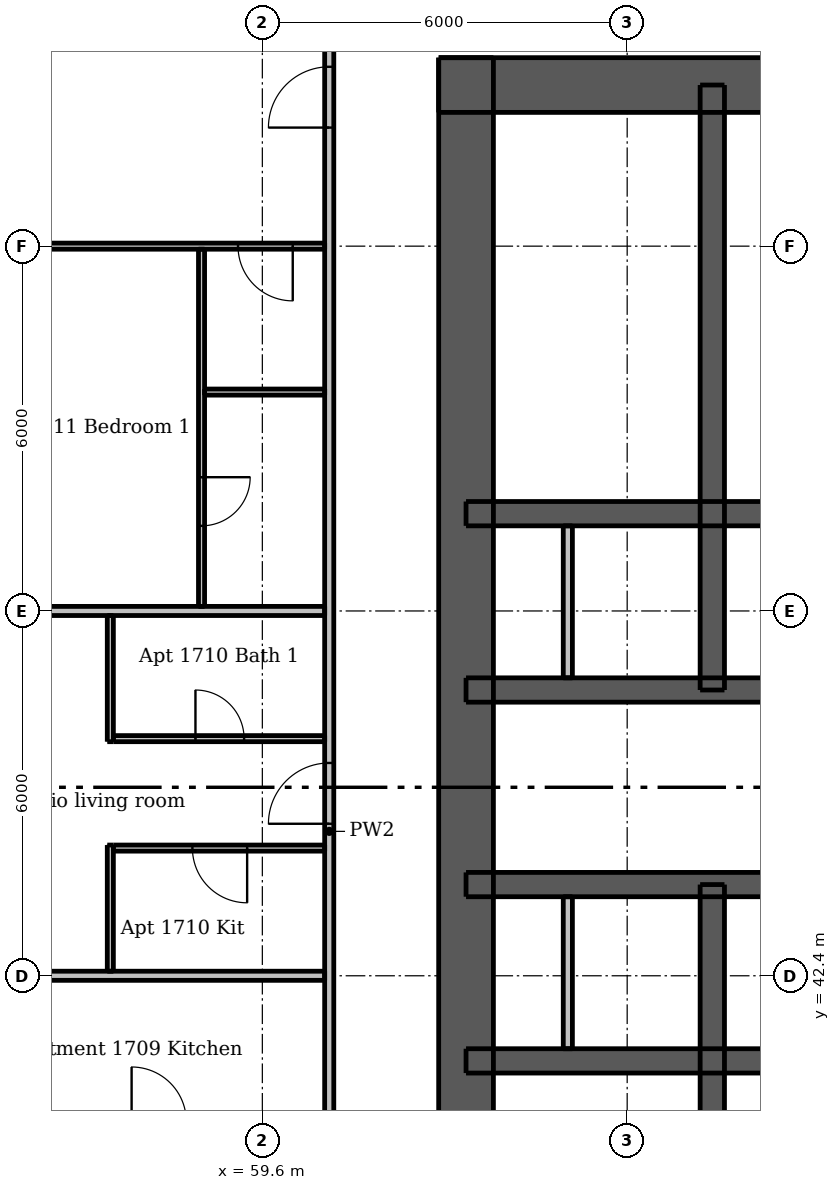
"""IFC4 building model, lengths in metres.
Left out: names, types, materials, properties, quantities, classifications, styles, units other than length and angle.
Written with IfcOpenShell. Run it as: python <this file> out.ifc"""

import sys

from ifc_helpers import new_model, si_unit, direction, frame, frame_2d, origin, place, context, subcontext, project, spatial, rectangle, extrude, element, fill, save


model = new_model("IFC4")
c1 = context("Model", 3, precision=1e-05, world=origin(), true_north=direction((0.0, 1.0)))
c2 = subcontext(c1, "Body", "Model", "MODEL_VIEW")
j1 = project(units=[si_unit("LENGTHUNIT", "METRE"), si_unit("PLANEANGLEUNIT", "RADIAN")], contexts=[c1])
p1 = place(None, origin())
s1 = spatial("IfcSite", under=j1, at=p1, CompositionType="ELEMENT")
p2 = place(p1, origin())
s2 = spatial("IfcBuilding", under=s1, at=p2, CompositionType="ELEMENT")
p3 = place(p2, frame((0.0, 0.0, 63.1)))
s3 = spatial("IfcBuildingStorey", under=s2, at=p3, CompositionType="ELEMENT", Elevation=63.1)
p4 = place(p3, frame((62.5, 57.05, 0.0), z_axis=(0.0, 0.0, 1.0), x_axis=(1.0, 0.0, 0.0)))
e1 = element("IfcWall", 1, at=p4, inside=s3, PredefinedType="SHEAR", context=c2, shape_type="SweptSolid", body=[
    extrude(rectangle(XDim=24.0, YDim=0.9, at=frame_2d((12.0, 0.0))), origin(), (0.0, 0.0, 1.0), 3.05),
])
p5 = place(p4, frame((20.85, 0.0, 0.0)))
e2 = element("IfcOpeningElement", 2, at=p5, cuts=e1, PredefinedType="OPENING", context=c2, shape_type="SweptSolid", body=[
    extrude(rectangle(XDim=1.1, YDim=2.1, at=frame_2d((0.55, 1.05))), frame((0.0, 0.46, 0.0), z_axis=(0.0, -1.0, 0.0), x_axis=(1.0, 0.0, 0.0)), (0.0, 0.0, 1.0), 0.92),
])
p6 = place(p4, frame((2.05, 0.0, 0.0)))
e3 = element("IfcOpeningElement", 3, at=p6, cuts=e1, PredefinedType="OPENING", context=c2, shape_type="SweptSolid", body=[
    extrude(rectangle(XDim=1.1, YDim=2.1, at=frame_2d((0.55, 1.05))), frame((0.0, 0.46, 0.0), z_axis=(0.0, -1.0, 0.0), x_axis=(1.0, 0.0, 0.0)), (0.0, 0.0, 1.0), 0.92),
])
p7 = place(p4, frame((6.44, 0.0, 0.0)))
e4 = element("IfcOpeningElement", 4, at=p7, cuts=e1, PredefinedType="OPENING", context=c2, shape_type="SweptSolid", body=[
    extrude(rectangle(XDim=0.9, YDim=2.1, at=frame_2d((0.45, 1.05))), frame((0.0, 0.46, 0.0), z_axis=(0.0, -1.0, 0.0), x_axis=(1.0, 0.0, 0.0)), (0.0, 0.0, 1.0), 0.92),
])
p8 = place(p4, frame((13.74, 0.0, 0.0)))
e5 = element("IfcOpeningElement", 5, at=p8, cuts=e1, PredefinedType="OPENING", context=c2, shape_type="SweptSolid", body=[
    extrude(rectangle(XDim=0.9, YDim=2.1, at=frame_2d((0.45, 1.05))), frame((0.0, 0.46, 0.0), z_axis=(0.0, -1.0, 0.0), x_axis=(1.0, 0.0, 0.0)), (0.0, 0.0, 1.0), 0.92),
])
p9 = place(p3, frame((62.95, 33.5, 0.0), z_axis=(0.0, 0.0, 1.0), x_axis=(0.0, 1.0, 0.0)))
e6 = element("IfcWall", 6, at=p9, inside=s3, PredefinedType="SHEAR", context=c2, shape_type="SweptSolid", body=[
    extrude(rectangle(XDim=24.0, YDim=0.9, at=frame_2d((12.0, 0.0))), origin(), (0.0, 0.0, 1.0), 3.05),
])
p10 = place(p9, frame((11.2, 0.0, 0.0)))
e7 = element("IfcOpeningElement", 7, at=p10, cuts=e6, PredefinedType="OPENING", context=c2, shape_type="SweptSolid", body=[
    extrude(rectangle(XDim=1.6, YDim=2.1, at=frame_2d((0.8, 1.05))), frame((0.0, 0.46, 0.0), z_axis=(0.0, -1.0, 0.0), x_axis=(1.0, 0.0, 0.0)), (0.0, 0.0, 1.0), 0.92),
])
p11 = place(p3, frame((62.95, 41.0, 0.0), z_axis=(0.0, 0.0, 1.0), x_axis=(1.0, 0.0, 0.0)))
e8 = element("IfcWall", 8, at=p11, inside=s3, PredefinedType="SHEAR", context=c2, shape_type="SweptSolid", body=[
    extrude(rectangle(XDim=23.1, YDim=0.4, at=frame_2d((11.55, 0.0))), origin(), (0.0, 0.0, 1.0), 3.05),
])
p12 = place(p3, frame((62.95, 43.9, 0.0), z_axis=(0.0, 0.0, 1.0), x_axis=(1.0, 0.0, 0.0)))
e9 = element("IfcWall", 9, at=p12, inside=s3, PredefinedType="SHEAR", context=c2, shape_type="SweptSolid", body=[
    extrude(rectangle(XDim=23.1, YDim=0.4, at=frame_2d((11.55, 0.0))), origin(), (0.0, 0.0, 1.0), 3.05),
])
p13 = place(p12, frame((0.662, 0.0, 0.0)))
e10 = element("IfcOpeningElement", 10, at=p13, cuts=e9, PredefinedType="OPENING", context=c2, shape_type="SweptSolid", body=[
    extrude(rectangle(XDim=0.8, YDim=2.1, at=frame_2d((0.4, 1.05))), frame((0.0, 0.21, 0.0), z_axis=(0.0, -1.0, 0.0), x_axis=(1.0, 0.0, 0.0)), (0.0, 0.0, 1.0), 0.42),
])
p14 = place(p12, frame((2.312, 0.0, 0.0)))
e11 = element("IfcOpeningElement", 11, at=p14, cuts=e9, PredefinedType="OPENING", context=c2, shape_type="SweptSolid", body=[
    extrude(rectangle(XDim=0.9, YDim=2.1, at=frame_2d((0.45, 1.05))), frame((0.0, 0.21, 0.0), z_axis=(0.0, -1.0, 0.0), x_axis=(1.0, 0.0, 0.0)), (0.0, 0.0, 1.0), 0.42),
])
p15 = place(p12, frame((20.5, 0.0, 0.0)))
e12 = element("IfcOpeningElement", 12, at=p15, cuts=e9, PredefinedType="OPENING", context=c2, shape_type="SweptSolid", body=[
    extrude(rectangle(XDim=0.9, YDim=2.1, at=frame_2d((0.45, 1.05))), frame((0.0, 0.21, 0.0), z_axis=(0.0, -1.0, 0.0), x_axis=(1.0, 0.0, 0.0)), (0.0, 0.0, 1.0), 0.42),
])
p16 = place(p12, frame((4.75, 0.0, 0.0)))
e13 = element("IfcOpeningElement", 13, at=p16, cuts=e9, PredefinedType="OPENING", context=c2, shape_type="SweptSolid", body=[
    extrude(rectangle(XDim=1.1, YDim=2.1, at=frame_2d((0.55, 1.05))), frame((0.0, 0.21, 0.0), z_axis=(0.0, -1.0, 0.0), x_axis=(1.0, 0.0, 0.0)), (0.0, 0.0, 1.0), 0.42),
])
p17 = place(p12, frame((7.25, 0.0, 0.0)))
e14 = element("IfcOpeningElement", 14, at=p17, cuts=e9, PredefinedType="OPENING", context=c2, shape_type="SweptSolid", body=[
    extrude(rectangle(XDim=1.1, YDim=2.1, at=frame_2d((0.55, 1.05))), frame((0.0, 0.21, 0.0), z_axis=(0.0, -1.0, 0.0), x_axis=(1.0, 0.0, 0.0)), (0.0, 0.0, 1.0), 0.42),
])
p18 = place(p12, frame((9.75, 0.0, 0.0)))
e15 = element("IfcOpeningElement", 15, at=p18, cuts=e9, PredefinedType="OPENING", context=c2, shape_type="SweptSolid", body=[
    extrude(rectangle(XDim=1.1, YDim=2.1, at=frame_2d((0.55, 1.05))), frame((0.0, 0.21, 0.0), z_axis=(0.0, -1.0, 0.0), x_axis=(1.0, 0.0, 0.0)), (0.0, 0.0, 1.0), 0.42),
])
p19 = place(p12, frame((12.25, 0.0, 0.0)))
e16 = element("IfcOpeningElement", 16, at=p19, cuts=e9, PredefinedType="OPENING", context=c2, shape_type="SweptSolid", body=[
    extrude(rectangle(XDim=1.1, YDim=2.1, at=frame_2d((0.55, 1.05))), frame((0.0, 0.21, 0.0), z_axis=(0.0, -1.0, 0.0), x_axis=(1.0, 0.0, 0.0)), (0.0, 0.0, 1.0), 0.42),
])
p20 = place(p12, frame((14.75, 0.0, 0.0)))
e17 = element("IfcOpeningElement", 17, at=p20, cuts=e9, PredefinedType="OPENING", context=c2, shape_type="SweptSolid", body=[
    extrude(rectangle(XDim=1.1, YDim=2.1, at=frame_2d((0.55, 1.05))), frame((0.0, 0.21, 0.0), z_axis=(0.0, -1.0, 0.0), x_axis=(1.0, 0.0, 0.0)), (0.0, 0.0, 1.0), 0.42),
])
p21 = place(p12, frame((17.25, 0.0, 0.0)))
e18 = element("IfcOpeningElement", 18, at=p21, cuts=e9, PredefinedType="OPENING", context=c2, shape_type="SweptSolid", body=[
    extrude(rectangle(XDim=1.1, YDim=2.1, at=frame_2d((0.55, 1.05))), frame((0.0, 0.21, 0.0), z_axis=(0.0, -1.0, 0.0), x_axis=(1.0, 0.0, 0.0)), (0.0, 0.0, 1.0), 0.42),
])
p22 = place(p3, frame((62.95, 47.1, 0.0), z_axis=(0.0, 0.0, 1.0), x_axis=(1.0, 0.0, 0.0)))
e19 = element("IfcWall", 19, at=p22, inside=s3, PredefinedType="SHEAR", context=c2, shape_type="SweptSolid", body=[
    extrude(rectangle(XDim=23.1, YDim=0.4, at=frame_2d((11.55, 0.0))), origin(), (0.0, 0.0, 1.0), 3.05),
])
p23 = place(p22, frame((0.662, 0.0, 0.0)))
e20 = element("IfcOpeningElement", 20, at=p23, cuts=e19, PredefinedType="OPENING", context=c2, shape_type="SweptSolid", body=[
    extrude(rectangle(XDim=0.8, YDim=2.1, at=frame_2d((0.4, 1.05))), frame((0.0, 0.21, 0.0), z_axis=(0.0, -1.0, 0.0), x_axis=(1.0, 0.0, 0.0)), (0.0, 0.0, 1.0), 0.42),
])
p24 = place(p22, frame((2.312, 0.0, 0.0)))
e21 = element("IfcOpeningElement", 21, at=p24, cuts=e19, PredefinedType="OPENING", context=c2, shape_type="SweptSolid", body=[
    extrude(rectangle(XDim=0.9, YDim=2.1, at=frame_2d((0.45, 1.05))), frame((0.0, 0.21, 0.0), z_axis=(0.0, -1.0, 0.0), x_axis=(1.0, 0.0, 0.0)), (0.0, 0.0, 1.0), 0.42),
])
p25 = place(p22, frame((20.5, 0.0, 0.0)))
e22 = element("IfcOpeningElement", 22, at=p25, cuts=e19, PredefinedType="OPENING", context=c2, shape_type="SweptSolid", body=[
    extrude(rectangle(XDim=0.9, YDim=2.1, at=frame_2d((0.45, 1.05))), frame((0.0, 0.21, 0.0), z_axis=(0.0, -1.0, 0.0), x_axis=(1.0, 0.0, 0.0)), (0.0, 0.0, 1.0), 0.42),
])
p26 = place(p3, frame((62.95, 50.0, 0.0), z_axis=(0.0, 0.0, 1.0), x_axis=(1.0, 0.0, 0.0)))
e23 = element("IfcWall", 23, at=p26, inside=s3, PredefinedType="SHEAR", context=c2, shape_type="SweptSolid", body=[
    extrude(rectangle(XDim=23.1, YDim=0.4, at=frame_2d((11.55, 0.0))), origin(), (0.0, 0.0, 1.0), 3.05),
])
p27 = place(p3, frame((67.0, 33.95, 0.0), z_axis=(0.0, 0.0, 1.0), x_axis=(0.0, 1.0, 0.0)))
e24 = element("IfcWall", 24, at=p27, inside=s3, PredefinedType="SHEAR", context=c2, shape_type="SweptSolid", body=[
    extrude(rectangle(XDim=9.95, YDim=0.4, at=frame_2d((4.975, 0.0))), origin(), (0.0, 0.0, 1.0), 3.05),
])
p28 = place(p27, frame((0.65, 0.0, 0.0)))
e25 = element("IfcOpeningElement", 25, at=p28, cuts=e24, PredefinedType="OPENING", context=c2, shape_type="SweptSolid", body=[
    extrude(rectangle(XDim=1.1, YDim=2.1, at=frame_2d((0.55, 1.05))), frame((0.0, 0.21, 0.0), z_axis=(0.0, -1.0, 0.0), x_axis=(1.0, 0.0, 0.0)), (0.0, 0.0, 1.0), 0.42),
])
p29 = place(p3, frame((67.0, 47.1, 0.0), z_axis=(0.0, 0.0, 1.0), x_axis=(0.0, 1.0, 0.0)))
e26 = element("IfcWall", 26, at=p29, inside=s3, PredefinedType="SHEAR", context=c2, shape_type="SweptSolid", body=[
    extrude(rectangle(XDim=9.95, YDim=0.4, at=frame_2d((4.975, 0.0))), origin(), (0.0, 0.0, 1.0), 3.05),
])
for number, where, z_axis, x_axis in (
    (27, (64.624, 41.2, 0.0), (0.0, 0.0, 1.0), (0.0, 1.0, 0.0)),
    (28, (64.624, 47.3, 0.0), (0.0, 0.0, 1.0), (0.0, 1.0, 0.0)),
):
    element("IfcWall", number, at=place(p3, frame(where, z_axis=z_axis, x_axis=x_axis)), inside=s3, PredefinedType="PLUMBINGWALL", context=c2, shape_type="SweptSolid", body=[
        extrude(rectangle(XDim=2.5, YDim=0.15, at=frame_2d((1.25, 0.0))), origin(), (0.0, 0.0, 1.0), 3.05),
    ])
for number, where, z_axis, x_axis in (
    (29, (57.1, 42.475, 0.0), (0.0, 0.0, 1.0), (0.0, 1.0, 0.0)),
    (30, (57.1, 46.25, 0.0), (0.0, 0.0, 1.0), (0.0, 1.0, 0.0)),
):
    element("IfcWall", number, at=place(p3, frame(where, z_axis=z_axis, x_axis=x_axis)), inside=s3, PredefinedType="PARTITIONING", context=c2, shape_type="SweptSolid", body=[
        extrude(rectangle(XDim=2.075, YDim=0.1, at=frame_2d((1.038, 0.0))), origin(), (0.0, 0.0, 1.0), 3.05),
    ])
p30 = place(p3, frame((58.6, 54.35, 0.0), z_axis=(0.0, 0.0, 1.0), x_axis=(0.0, -1.0, 0.0)))
e31 = element("IfcWall", 31, at=p30, inside=s3, PredefinedType="PARTITIONING", context=c2, shape_type="SweptSolid", body=[
    extrude(rectangle(XDim=5.875, YDim=0.1, at=frame_2d((2.938, 0.0))), origin(), (0.0, 0.0, 1.0), 3.05),
])
p31 = place(p30, frame((3.75, 0.0, 0.0)))
e32 = element("IfcOpeningElement", 32, at=p31, cuts=e31, PredefinedType="OPENING", context=c2, shape_type="SweptSolid", body=[
    extrude(rectangle(XDim=0.8, YDim=2.1, at=frame_2d((0.4, 1.05))), frame((0.0, 0.06, 0.0), z_axis=(0.0, -1.0, 0.0), x_axis=(1.0, 0.0, 0.0)), (0.0, 0.0, 1.0), 0.12),
])
p32 = place(p3, frame((60.625, 54.4, 0.0), z_axis=(0.0, 0.0, 1.0), x_axis=(-1.0, 0.0, 0.0)))
e33 = element("IfcWall", 33, at=p32, inside=s3, PredefinedType="PARTITIONING", context=c2, shape_type="SweptSolid", body=[
    extrude(rectangle(XDim=8.625, YDim=0.1, at=frame_2d((4.312, 0.0))), origin(), (0.0, 0.0, 1.0), 2.516),
])
p33 = place(p32, frame((0.525, 0.0, 0.0)))
e34 = element("IfcOpeningElement", 34, at=p33, cuts=e33, PredefinedType="OPENING", context=c2, shape_type="SweptSolid", body=[
    extrude(rectangle(XDim=0.9, YDim=2.1, at=frame_2d((0.45, 1.05))), frame((0.0, 0.06, 0.0), z_axis=(0.0, -1.0, 0.0), x_axis=(1.0, 0.0, 0.0)), (0.0, 0.0, 1.0), 0.12),
])
p34 = place(p32, frame((4.875, 0.0, 0.0)))
e35 = element("IfcOpeningElement", 35, at=p34, cuts=e33, PredefinedType="OPENING", context=c2, shape_type="SweptSolid", body=[
    extrude(rectangle(XDim=0.9, YDim=2.1, at=frame_2d((0.45, 1.05))), frame((0.0, 0.06, 0.0), z_axis=(0.0, -1.0, 0.0), x_axis=(1.0, 0.0, 0.0)), (0.0, 0.0, 1.0), 0.12),
])
p35 = place(p3, frame((58.65, 52.0, 0.0), z_axis=(0.0, 0.0, 1.0), x_axis=(1.0, 0.0, 0.0)))
e36 = element("IfcWall", 36, at=p35, inside=s3, PredefinedType="PARTITIONING", context=c2, shape_type="SweptSolid", body=[
    extrude(rectangle(XDim=1.975, YDim=0.1, at=frame_2d((0.988, 0.0))), origin(), (0.0, 0.0, 1.0), 3.05),
])
p36 = place(p3, frame((57.15, 46.3, 0.0), z_axis=(0.0, 0.0, 1.0), x_axis=(1.0, 0.0, 0.0)))
e37 = element("IfcWall", 37, at=p36, inside=s3, PredefinedType="PARTITIONING", context=c2, shape_type="SweptSolid", body=[
    extrude(rectangle(XDim=3.475, YDim=0.1, at=frame_2d((1.738, 0.0))), origin(), (0.0, 0.0, 1.0), 3.05),
])
p37 = place(p36, frame((1.35, 0.0, 0.0)))
e38 = element("IfcOpeningElement", 38, at=p37, cuts=e37, PredefinedType="OPENING", context=c2, shape_type="SweptSolid", body=[
    extrude(rectangle(XDim=0.8, YDim=2.1, at=frame_2d((0.4, 1.05))), frame((0.0, 0.06, 0.0), z_axis=(0.0, -1.0, 0.0), x_axis=(1.0, 0.0, 0.0)), (0.0, 0.0, 1.0), 0.12),
])
p38 = place(p3, frame((60.625, 44.5, 0.0), z_axis=(0.0, 0.0, 1.0), x_axis=(-1.0, 0.0, 0.0)))
e39 = element("IfcWall", 39, at=p38, inside=s3, PredefinedType="PARTITIONING", context=c2, shape_type="SweptSolid", body=[
    extrude(rectangle(XDim=3.475, YDim=0.1, at=frame_2d((1.738, 0.0))), origin(), (0.0, 0.0, 1.0), 3.05),
])
p39 = place(p38, frame((1.275, 0.0, 0.0)))
e40 = element("IfcOpeningElement", 40, at=p39, cuts=e39, PredefinedType="OPENING", context=c2, shape_type="SweptSolid", body=[
    extrude(rectangle(XDim=0.9, YDim=2.1, at=frame_2d((0.45, 1.05))), frame((0.0, 0.06, 0.0), z_axis=(0.0, -1.0, 0.0), x_axis=(1.0, 0.0, 0.0)), (0.0, 0.0, 1.0), 0.12),
])
p40 = place(p3, frame((60.7, 30.325, 0.0), z_axis=(0.0, 0.0, 1.0), x_axis=(0.0, 1.0, 0.0)))
e41 = element("IfcWall", 41, at=p40, inside=s3, PredefinedType="PARTITIONING", context=c2, shape_type="SweptSolid", body=[
    extrude(rectangle(XDim=28.9, YDim=0.15, at=frame_2d((14.45, 0.0))), origin(), (0.0, 0.0, 1.0), 3.05),
])
p41 = place(p40, frame((7.375, 0.0, 0.0)))
e42 = element("IfcOpeningElement", 42, at=p41, cuts=e41, PredefinedType="OPENING", context=c2, shape_type="SweptSolid", body=[
    extrude(rectangle(XDim=1.0, YDim=2.1, at=frame_2d((0.5, 1.05))), frame((0.0, 0.085, 0.0), z_axis=(0.0, -1.0, 0.0), x_axis=(1.0, 0.0, 0.0)), (0.0, 0.0, 1.0), 0.17),
])
p42 = place(p40, frame((14.575, 0.0, 0.0)))
e43 = element("IfcOpeningElement", 43, at=p42, cuts=e41, PredefinedType="OPENING", context=c2, shape_type="SweptSolid", body=[
    extrude(rectangle(XDim=1.0, YDim=2.1, at=frame_2d((0.5, 1.05))), frame((0.0, 0.085, 0.0), z_axis=(0.0, -1.0, 0.0), x_axis=(1.0, 0.0, 0.0)), (0.0, 0.0, 1.0), 0.17),
])
p43 = place(p40, frame((26.025, 0.0, 0.0)))
e44 = element("IfcOpeningElement", 44, at=p43, cuts=e41, PredefinedType="OPENING", context=c2, shape_type="SweptSolid", body=[
    extrude(rectangle(XDim=1.0, YDim=2.1, at=frame_2d((0.5, 1.05))), frame((0.0, 0.085, 0.0), z_axis=(0.0, -1.0, 0.0), x_axis=(1.0, 0.0, 0.0)), (0.0, 0.0, 1.0), 0.17),
])
for number, where, z_axis, x_axis in (
    (45, (52.0, 48.4, 0.0), (0.0, 0.0, 1.0), (1.0, 0.0, 0.0)),
    (46, (52.0, 42.4, 0.0), (0.0, 0.0, 1.0), (1.0, 0.0, 0.0)),
):
    element("IfcWall", number, at=place(p3, frame(where, z_axis=z_axis, x_axis=x_axis)), inside=s3, PredefinedType="PARTITIONING", context=c2, shape_type="SweptSolid", body=[
        extrude(rectangle(XDim=8.625, YDim=0.15, at=frame_2d((4.312, 0.0))), origin(), (0.0, 0.0, 1.0), 2.516),
    ])
p44 = place(p6, origin())
e47 = element("IfcDoor", 47, at=p44, inside=s3, OperationType="SINGLE_SWING_LEFT", PredefinedType="DOOR", context=c2, shape_type="SweptSolid", body=[
    extrude(rectangle(XDim=1.1, YDim=2.1, at=frame_2d((0.55, 1.05))), frame((0.0, -0.388, 0.0), z_axis=(0.0, -1.0, 0.0), x_axis=(1.0, 0.0, 0.0)), (0.0, 0.0, 1.0), 0.05),
])
fill(e3, e47)
p45 = place(p10, origin())
e48 = element("IfcDoor", 48, at=p45, inside=s3, OperationType="DOUBLE_DOOR_SINGLE_SWING", PredefinedType="DOOR", context=c2, shape_type="SweptSolid", body=[
    extrude(rectangle(XDim=1.6, YDim=2.1, at=frame_2d((0.8, 1.05))), frame((0.0, -0.388, 0.0), z_axis=(0.0, -1.0, 0.0), x_axis=(1.0, 0.0, 0.0)), (0.0, 0.0, 1.0), 0.05),
])
fill(e7, e48)
p46 = place(p13, origin())
e49 = element("IfcDoor", 49, at=p46, inside=s3, OperationType="SINGLE_SWING_LEFT", PredefinedType="DOOR", context=c2, shape_type="SweptSolid", body=[
    extrude(rectangle(XDim=0.8, YDim=2.1, at=frame_2d((0.4, 1.05))), frame((0.0, -0.138, 0.0), z_axis=(0.0, -1.0, 0.0), x_axis=(1.0, 0.0, 0.0)), (0.0, 0.0, 1.0), 0.05),
])
fill(e10, e49)
p47 = place(p14, origin())
e50 = element("IfcDoor", 50, at=p47, inside=s3, OperationType="SINGLE_SWING_RIGHT", PredefinedType="DOOR", context=c2, shape_type="SweptSolid", body=[
    extrude(rectangle(XDim=0.9, YDim=2.1, at=frame_2d((0.45, 1.05))), frame((0.0, -0.138, 0.0), z_axis=(0.0, -1.0, 0.0), x_axis=(1.0, 0.0, 0.0)), (0.0, 0.0, 1.0), 0.05),
])
fill(e11, e50)
p48 = place(p23, origin())
e51 = element("IfcDoor", 51, at=p48, inside=s3, OperationType="SINGLE_SWING_LEFT", PredefinedType="DOOR", context=c2, shape_type="SweptSolid", body=[
    extrude(rectangle(XDim=0.8, YDim=2.1, at=frame_2d((0.4, 1.05))), frame((0.0, 0.188, 0.0), z_axis=(0.0, -1.0, 0.0), x_axis=(1.0, 0.0, 0.0)), (0.0, 0.0, 1.0), 0.05),
])
fill(e20, e51)
p49 = place(p24, origin())
e52 = element("IfcDoor", 52, at=p49, inside=s3, OperationType="SINGLE_SWING_RIGHT", PredefinedType="DOOR", context=c2, shape_type="SweptSolid", body=[
    extrude(rectangle(XDim=0.9, YDim=2.1, at=frame_2d((0.45, 1.05))), frame((0.0, 0.188, 0.0), z_axis=(0.0, -1.0, 0.0), x_axis=(1.0, 0.0, 0.0)), (0.0, 0.0, 1.0), 0.05),
])
fill(e21, e52)
p50 = place(p16, origin())
e53 = element("IfcDoor", 53, at=p50, inside=s3, OperationType="DOUBLE_DOOR_SLIDING", PredefinedType="DOOR", context=c2, shape_type="SweptSolid", body=[
    extrude(rectangle(XDim=1.1, YDim=2.1, at=frame_2d((0.55, 1.05))), frame((0.0, 0.025, 0.0), z_axis=(0.0, -1.0, 0.0), x_axis=(1.0, 0.0, 0.0)), (0.0, 0.0, 1.0), 0.05),
])
fill(e13, e53)
p51 = place(p42, origin())
e54 = element("IfcDoor", 54, at=p51, inside=s3, OperationType="SINGLE_SWING_LEFT", PredefinedType="DOOR", context=c2, shape_type="SweptSolid", body=[
    extrude(rectangle(XDim=1.0, YDim=2.1, at=frame_2d((0.5, 1.05))), frame((0.0, 0.025, 0.0), z_axis=(0.0, -1.0, 0.0), x_axis=(1.0, 0.0, 0.0)), (0.0, 0.0, 1.0), 0.05),
])
fill(e43, e54)
p52 = place(p39, origin())
e55 = element("IfcDoor", 55, at=p52, inside=s3, OperationType="SINGLE_SWING_LEFT", PredefinedType="DOOR", context=c2, shape_type="SweptSolid", body=[
    extrude(rectangle(XDim=0.9, YDim=2.1, at=frame_2d((0.45, 1.05))), frame((0.0, 0.025, 0.0), z_axis=(0.0, -1.0, 0.0), x_axis=(1.0, 0.0, 0.0)), (0.0, 0.0, 1.0), 0.05),
])
fill(e40, e55)
p53 = place(p37, origin())
e56 = element("IfcDoor", 56, at=p53, inside=s3, OperationType="SINGLE_SWING_LEFT", PredefinedType="DOOR", context=c2, shape_type="SweptSolid", body=[
    extrude(rectangle(XDim=0.8, YDim=2.1, at=frame_2d((0.4, 1.05))), frame((0.0, 0.025, 0.0), z_axis=(0.0, -1.0, 0.0), x_axis=(1.0, 0.0, 0.0)), (0.0, 0.0, 1.0), 0.05),
])
fill(e38, e56)
p54 = place(p43, origin())
e57 = element("IfcDoor", 57, at=p54, inside=s3, OperationType="SINGLE_SWING_LEFT", PredefinedType="DOOR", context=c2, shape_type="SweptSolid", body=[
    extrude(rectangle(XDim=1.0, YDim=2.1, at=frame_2d((0.5, 1.05))), frame((0.0, 0.025, 0.0), z_axis=(0.0, -1.0, 0.0), x_axis=(1.0, 0.0, 0.0)), (0.0, 0.0, 1.0), 0.05),
])
fill(e44, e57)
p55 = place(p33, origin())
e58 = element("IfcDoor", 58, at=p55, inside=s3, OperationType="SINGLE_SWING_LEFT", PredefinedType="DOOR", context=c2, shape_type="SweptSolid", body=[
    extrude(rectangle(XDim=0.9, YDim=2.1, at=frame_2d((0.45, 1.05))), frame((0.0, 0.025, 0.0), z_axis=(0.0, -1.0, 0.0), x_axis=(1.0, 0.0, 0.0)), (0.0, 0.0, 1.0), 0.05),
])
fill(e34, e58)
p56 = place(p31, origin())
e59 = element("IfcDoor", 59, at=p56, inside=s3, OperationType="SINGLE_SWING_LEFT", PredefinedType="DOOR", context=c2, shape_type="SweptSolid", body=[
    extrude(rectangle(XDim=0.8, YDim=2.1, at=frame_2d((0.4, 1.05))), frame((0.0, 0.025, 0.0), z_axis=(0.0, -1.0, 0.0), x_axis=(1.0, 0.0, 0.0)), (0.0, 0.0, 1.0), 0.05),
])
fill(e32, e59)
save(model, sys.argv[1])
